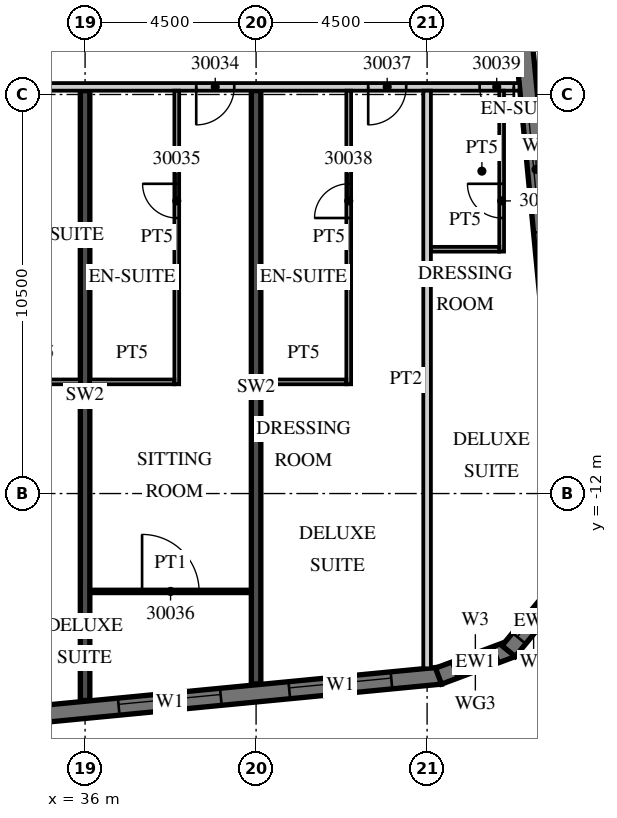
"""IFC4 building model, lengths in metres.
Left out: names, types, materials, properties, quantities, classifications, styles, units other than length and angle.
Written with IfcOpenShell. Run it as: python <this file> out.ifc"""

import sys

from ifc_helpers import new_model, si_unit, direction, frame, frame_2d, origin, place, context, subcontext, project, spatial, polyline, rectangle, outline, extrude, element, fill, save


model = new_model("IFC4")
c1 = context("Model", 3, precision=1e-05, world=origin(), true_north=direction((0.0, 1.0)))
c2 = subcontext(c1, "Body", "Model", "MODEL_VIEW")
j1 = project(units=[si_unit("LENGTHUNIT", "METRE"), si_unit("PLANEANGLEUNIT", "RADIAN")], contexts=[c1])
p1 = place(None, origin())
s1 = spatial("IfcSite", under=j1, at=p1, CompositionType="ELEMENT")
p2 = place(p1, origin())
s2 = spatial("IfcBuilding", under=s1, at=p2, CompositionType="ELEMENT")
p3 = place(p2, frame((0.0, 0.0, 133.9)))
s3 = spatial("IfcBuildingStorey", under=s2, at=p3, CompositionType="ELEMENT", Elevation=133.9)
p4 = place(p3, frame((36.0, -17.444, 0.0), z_axis=(0.0, 0.0, 1.0), x_axis=(0.0, 1.0, 0.0)))
e1 = element("IfcWall", 1, at=p4, inside=s3, PredefinedType="SHEAR", context=c2, shape_type="SweptSolid", body=[
    extrude(rectangle(XDim=16.044, YDim=0.25, at=frame_2d((8.022, 0.0))), origin(), (0.0, 0.0, 1.0), 3.3),
])
p5 = place(p3, frame((40.5, -17.011, 0.0), z_axis=(0.0, 0.0, 1.0), x_axis=(0.0, 1.0, 0.0)))
e2 = element("IfcWall", 2, at=p5, inside=s3, PredefinedType="SHEAR", context=c2, shape_type="SweptSolid", body=[
    extrude(rectangle(XDim=15.611, YDim=0.25, at=frame_2d((7.805, 0.0))), origin(), (0.0, 0.0, 1.0), 3.3),
])
p6 = place(p3, frame((-13.521, -22.46, 0.0), z_axis=(0.0, 0.0, 1.0), x_axis=(0.995396096335, 0.095846812164, 0.0)))
e3 = element("IfcWall", 3, at=p6, inside=s3, PredefinedType="SOLIDWALL", context=c2, shape_type="SweptSolid", body=[
    extrude(rectangle(XDim=59.151, YDim=0.45, at=frame_2d((29.575, 0.0))), origin(), (0.0, 0.0, 1.0), 3.02),
])
p7 = place(p6, frame((0.91, 0.0, 0.45)))
e4 = element("IfcOpeningElement", 4, at=p7, cuts=e3, PredefinedType="OPENING", context=c2, shape_type="SweptSolid", body=[
    extrude(rectangle(XDim=2.7, YDim=2.25, at=frame_2d((1.35, 1.125))), frame((0.0, 0.235, 0.0), z_axis=(0.0, -1.0, 0.0), x_axis=(1.0, 0.0, 0.0)), (0.0, 0.0, 1.0), 0.47),
])
p8 = place(p6, frame((5.431, 0.0, 0.45)))
e5 = element("IfcOpeningElement", 5, at=p8, cuts=e3, PredefinedType="OPENING", context=c2, shape_type="SweptSolid", body=[
    extrude(rectangle(XDim=2.7, YDim=2.25, at=frame_2d((1.35, 1.125))), frame((0.0, 0.235, 0.0), z_axis=(0.0, -1.0, 0.0), x_axis=(1.0, 0.0, 0.0)), (0.0, 0.0, 1.0), 0.47),
])
p9 = place(p6, frame((9.952, 0.0, 0.45)))
e6 = element("IfcOpeningElement", 6, at=p9, cuts=e3, PredefinedType="OPENING", context=c2, shape_type="SweptSolid", body=[
    extrude(rectangle(XDim=2.7, YDim=2.25, at=frame_2d((1.35, 1.125))), frame((0.0, 0.235, 0.0), z_axis=(0.0, -1.0, 0.0), x_axis=(1.0, 0.0, 0.0)), (0.0, 0.0, 1.0), 0.47),
])
p10 = place(p6, frame((14.473, 0.0, 0.45)))
e7 = element("IfcOpeningElement", 7, at=p10, cuts=e3, PredefinedType="OPENING", context=c2, shape_type="SweptSolid", body=[
    extrude(rectangle(XDim=2.7, YDim=2.25, at=frame_2d((1.35, 1.125))), frame((0.0, 0.235, 0.0), z_axis=(0.0, -1.0, 0.0), x_axis=(1.0, 0.0, 0.0)), (0.0, 0.0, 1.0), 0.47),
])
p11 = place(p6, frame((18.994, 0.0, 0.45)))
e8 = element("IfcOpeningElement", 8, at=p11, cuts=e3, PredefinedType="OPENING", context=c2, shape_type="SweptSolid", body=[
    extrude(rectangle(XDim=2.7, YDim=2.25, at=frame_2d((1.35, 1.125))), frame((0.0, 0.235, 0.0), z_axis=(0.0, -1.0, 0.0), x_axis=(1.0, 0.0, 0.0)), (0.0, 0.0, 1.0), 0.47),
])
p12 = place(p6, frame((23.514, 0.0, 0.45)))
e9 = element("IfcOpeningElement", 9, at=p12, cuts=e3, PredefinedType="OPENING", context=c2, shape_type="SweptSolid", body=[
    extrude(rectangle(XDim=2.7, YDim=2.25, at=frame_2d((1.35, 1.125))), frame((0.0, 0.235, 0.0), z_axis=(0.0, -1.0, 0.0), x_axis=(1.0, 0.0, 0.0)), (0.0, 0.0, 1.0), 0.47),
])
p13 = place(p6, frame((28.035, 0.0, 0.45)))
e10 = element("IfcOpeningElement", 10, at=p13, cuts=e3, PredefinedType="OPENING", context=c2, shape_type="SweptSolid", body=[
    extrude(rectangle(XDim=2.7, YDim=2.25, at=frame_2d((1.35, 1.125))), frame((0.0, 0.235, 0.0), z_axis=(0.0, -1.0, 0.0), x_axis=(1.0, 0.0, 0.0)), (0.0, 0.0, 1.0), 0.47),
])
p14 = place(p6, frame((32.556, 0.0, 0.45)))
e11 = element("IfcOpeningElement", 11, at=p14, cuts=e3, PredefinedType="OPENING", context=c2, shape_type="SweptSolid", body=[
    extrude(rectangle(XDim=2.7, YDim=2.25, at=frame_2d((1.35, 1.125))), frame((0.0, 0.235, 0.0), z_axis=(0.0, -1.0, 0.0), x_axis=(1.0, 0.0, 0.0)), (0.0, 0.0, 1.0), 0.47),
])
p15 = place(p6, frame((37.077, 0.0, 0.45)))
e12 = element("IfcOpeningElement", 12, at=p15, cuts=e3, PredefinedType="OPENING", context=c2, shape_type="SweptSolid", body=[
    extrude(rectangle(XDim=2.7, YDim=2.25, at=frame_2d((1.35, 1.125))), frame((0.0, 0.235, 0.0), z_axis=(0.0, -1.0, 0.0), x_axis=(1.0, 0.0, 0.0)), (0.0, 0.0, 1.0), 0.47),
])
p16 = place(p6, frame((41.598, 0.0, 0.45)))
e13 = element("IfcOpeningElement", 13, at=p16, cuts=e3, PredefinedType="OPENING", context=c2, shape_type="SweptSolid", body=[
    extrude(rectangle(XDim=2.7, YDim=2.25, at=frame_2d((1.35, 1.125))), frame((0.0, 0.235, 0.0), z_axis=(0.0, -1.0, 0.0), x_axis=(1.0, 0.0, 0.0)), (0.0, 0.0, 1.0), 0.47),
])
p17 = place(p6, frame((46.118, 0.0, 0.45)))
e14 = element("IfcOpeningElement", 14, at=p17, cuts=e3, PredefinedType="OPENING", context=c2, shape_type="SweptSolid", body=[
    extrude(rectangle(XDim=2.7, YDim=2.25, at=frame_2d((1.35, 1.125))), frame((0.0, 0.235, 0.0), z_axis=(0.0, -1.0, 0.0), x_axis=(1.0, 0.0, 0.0)), (0.0, 0.0, 1.0), 0.47),
])
p18 = place(p6, frame((50.639, 0.0, 0.45)))
e15 = element("IfcOpeningElement", 15, at=p18, cuts=e3, PredefinedType="OPENING", context=c2, shape_type="SweptSolid", body=[
    extrude(rectangle(XDim=2.7, YDim=2.25, at=frame_2d((1.35, 1.125))), frame((0.0, 0.235, 0.0), z_axis=(0.0, -1.0, 0.0), x_axis=(1.0, 0.0, 0.0)), (0.0, 0.0, 1.0), 0.47),
])
p19 = place(p6, frame((55.15, 0.0, 0.45)))
e16 = element("IfcOpeningElement", 16, at=p19, cuts=e3, PredefinedType="OPENING", context=c2, shape_type="SweptSolid", body=[
    extrude(rectangle(XDim=2.7, YDim=2.25, at=frame_2d((1.35, 1.125))), frame((0.0, 0.235, 0.0), z_axis=(0.0, -1.0, 0.0), x_axis=(1.0, 0.0, 0.0)), (0.0, 0.0, 1.0), 0.47),
])
p20 = place(p3, frame((45.3, -16.804, 0.0), z_axis=(0.0, 0.0, 1.0), x_axis=(0.936677599948, 0.350192909346, 0.0)))
e17 = element("IfcWall", 17, at=p20, inside=s3, PredefinedType="SOLIDWALL", context=c2, shape_type="SweptSolid", body=[
    extrude(outline(polyline([(0.0, -0.225), (2.071, -0.225), (1.95, 0.225), (0.121, 0.225), (0.0, -0.225)])), origin(), (0.0, 0.0, 1.0), 3.02),
])
p21 = place(p20, frame((0.435, 0.0, 0.45)))
e18 = element("IfcOpeningElement", 18, at=p21, cuts=e17, PredefinedType="OPENING", context=c2, shape_type="SweptSolid", body=[
    extrude(rectangle(XDim=1.2, YDim=2.25, at=frame_2d((0.6, 1.125))), frame((0.0, 0.235, 0.0), z_axis=(0.0, -1.0, 0.0), x_axis=(1.0, 0.0, 0.0)), (0.0, 0.0, 1.0), 0.47),
])
p22 = place(p3, frame((47.145, -16.147, 0.0), z_axis=(0.0, 0.0, 1.0), x_axis=(0.635988241739, 0.771698747161, 0.0)))
e19 = element("IfcWall", 19, at=p22, inside=s3, PredefinedType="SOLIDWALL", context=c2, shape_type="SweptSolid", body=[
    extrude(outline(polyline([(0.0, -0.225), (2.071, -0.225), (1.95, 0.225), (0.121, 0.225), (0.0, -0.225)])), origin(), (0.0, 0.0, 1.0), 3.02),
])
p23 = place(p22, frame((0.435, 0.0, 0.45)))
e20 = element("IfcOpeningElement", 20, at=p23, cuts=e19, PredefinedType="OPENING", context=c2, shape_type="SweptSolid", body=[
    extrude(rectangle(XDim=1.2, YDim=2.25, at=frame_2d((0.6, 1.125))), frame((0.0, 0.235, 0.0), z_axis=(0.0, -1.0, 0.0), x_axis=(1.0, 0.0, 0.0)), (0.0, 0.0, 1.0), 0.47),
])
p24 = place(p3, frame((48.753, -12.672, 0.0), z_axis=(0.0, 0.0, 1.0), x_axis=(-0.095842661909, 0.995396495954, 0.0)))
e21 = element("IfcWall", 21, at=p24, inside=s3, PredefinedType="SOLIDWALL", context=c2, shape_type="SweptSolid", body=[
    extrude(rectangle(XDim=35.0, YDim=0.45, at=frame_2d((17.5, 0.0))), origin(), (0.0, 0.0, 1.0), 3.02),
])
p25 = place(p24, frame((3.072, 0.0, 0.45)))
e22 = element("IfcOpeningElement", 22, at=p25, cuts=e21, PredefinedType="OPENING", context=c2, shape_type="SweptSolid", body=[
    extrude(rectangle(XDim=3.3, YDim=2.25, at=frame_2d((1.65, 1.125))), frame((0.0, 0.235, 0.0), z_axis=(0.0, -1.0, 0.0), x_axis=(1.0, 0.0, 0.0)), (0.0, 0.0, 1.0), 0.47),
])
p26 = place(p24, frame((7.593, 0.0, 0.45)))
e23 = element("IfcOpeningElement", 23, at=p26, cuts=e21, PredefinedType="OPENING", context=c2, shape_type="SweptSolid", body=[
    extrude(rectangle(XDim=3.3, YDim=2.25, at=frame_2d((1.65, 1.125))), frame((0.0, 0.235, 0.0), z_axis=(0.0, -1.0, 0.0), x_axis=(1.0, 0.0, 0.0)), (0.0, 0.0, 1.0), 0.47),
])
p27 = place(p3, frame((-13.5, -1.3, 0.0), z_axis=(0.0, 0.0, 1.0), x_axis=(1.0, 0.0, 0.0)))
e24 = element("IfcWall", 24, at=p27, inside=s3, PredefinedType="PARTITIONING", context=c2, shape_type="SweptSolid", body=[
    extrude(rectangle(XDim=60.932, YDim=0.2, at=frame_2d((30.466, 0.0))), origin(), (0.0, 0.0, 1.0), 3.02),
])
p28 = place(p27, frame((2.925, 0.0, 0.0)))
e25 = element("IfcOpeningElement", 25, at=p28, cuts=e24, PredefinedType="OPENING", context=c2, shape_type="SweptSolid", body=[
    extrude(rectangle(XDim=1.0, YDim=2.1, at=frame_2d((0.5, 1.05))), frame((0.0, 0.11, 0.0), z_axis=(0.0, -1.0, 0.0), x_axis=(1.0, 0.0, 0.0)), (0.0, 0.0, 1.0), 0.22),
])
p29 = place(p27, frame((9.863, 0.0, 0.0)))
e26 = element("IfcOpeningElement", 26, at=p29, cuts=e24, PredefinedType="OPENING", context=c2, shape_type="SweptSolid", body=[
    extrude(rectangle(XDim=1.2, YDim=2.1, at=frame_2d((0.6, 1.05))), frame((0.0, 0.11, 0.0), z_axis=(0.0, -1.0, 0.0), x_axis=(1.0, 0.0, 0.0)), (0.0, 0.0, 1.0), 0.22),
])
p30 = place(p27, frame((14.075, 0.0, 0.0)))
e27 = element("IfcOpeningElement", 27, at=p30, cuts=e24, PredefinedType="OPENING", context=c2, shape_type="SweptSolid", body=[
    extrude(rectangle(XDim=1.0, YDim=2.1, at=frame_2d((0.5, 1.05))), frame((0.0, 0.11, 0.0), z_axis=(0.0, -1.0, 0.0), x_axis=(1.0, 0.0, 0.0)), (0.0, 0.0, 1.0), 0.22),
])
p31 = place(p27, frame((18.55, 0.0, 0.0)))
e28 = element("IfcOpeningElement", 28, at=p31, cuts=e24, PredefinedType="OPENING", context=c2, shape_type="SweptSolid", body=[
    extrude(rectangle(XDim=1.0, YDim=2.1, at=frame_2d((0.5, 1.05))), frame((0.0, 0.11, 0.0), z_axis=(0.0, -1.0, 0.0), x_axis=(1.0, 0.0, 0.0)), (0.0, 0.0, 1.0), 0.22),
])
p32 = place(p27, frame((24.938, 0.0, 0.0)))
e29 = element("IfcOpeningElement", 29, at=p32, cuts=e24, PredefinedType="OPENING", context=c2, shape_type="SweptSolid", body=[
    extrude(rectangle(XDim=1.2, YDim=2.1, at=frame_2d((0.6, 1.05))), frame((0.0, 0.11, 0.0), z_axis=(0.0, -1.0, 0.0), x_axis=(1.0, 0.0, 0.0)), (0.0, 0.0, 1.0), 0.22),
])
p33 = place(p27, frame((36.862, 0.0, 0.0)))
e30 = element("IfcOpeningElement", 30, at=p33, cuts=e24, PredefinedType="OPENING", context=c2, shape_type="SweptSolid", body=[
    extrude(rectangle(XDim=1.2, YDim=2.1, at=frame_2d((0.6, 1.05))), frame((0.0, 0.11, 0.0), z_axis=(0.0, -1.0, 0.0), x_axis=(1.0, 0.0, 0.0)), (0.0, 0.0, 1.0), 0.22),
])
p34 = place(p27, frame((41.075, 0.0, 0.0)))
e31 = element("IfcOpeningElement", 31, at=p34, cuts=e24, PredefinedType="OPENING", context=c2, shape_type="SweptSolid", body=[
    extrude(rectangle(XDim=1.0, YDim=2.1, at=frame_2d((0.5, 1.05))), frame((0.0, 0.11, 0.0), z_axis=(0.0, -1.0, 0.0), x_axis=(1.0, 0.0, 0.0)), (0.0, 0.0, 1.0), 0.22),
])
p35 = place(p27, frame((45.55, 0.0, 0.0)))
e32 = element("IfcOpeningElement", 32, at=p35, cuts=e24, PredefinedType="OPENING", context=c2, shape_type="SweptSolid", body=[
    extrude(rectangle(XDim=1.0, YDim=2.1, at=frame_2d((0.5, 1.05))), frame((0.0, 0.11, 0.0), z_axis=(0.0, -1.0, 0.0), x_axis=(1.0, 0.0, 0.0)), (0.0, 0.0, 1.0), 0.22),
])
p36 = place(p27, frame((52.425, 0.0, 0.0)))
e33 = element("IfcOpeningElement", 33, at=p36, cuts=e24, PredefinedType="OPENING", context=c2, shape_type="SweptSolid", body=[
    extrude(rectangle(XDim=1.0, YDim=2.1, at=frame_2d((0.5, 1.05))), frame((0.0, 0.11, 0.0), z_axis=(0.0, -1.0, 0.0), x_axis=(1.0, 0.0, 0.0)), (0.0, 0.0, 1.0), 0.22),
])
p37 = place(p27, frame((56.95, 0.0, 0.0)))
e34 = element("IfcOpeningElement", 34, at=p37, cuts=e24, PredefinedType="OPENING", context=c2, shape_type="SweptSolid", body=[
    extrude(rectangle(XDim=1.0, YDim=2.1, at=frame_2d((0.5, 1.05))), frame((0.0, 0.11, 0.0), z_axis=(0.0, -1.0, 0.0), x_axis=(1.0, 0.0, 0.0)), (0.0, 0.0, 1.0), 0.22),
])
p38 = place(p27, frame((59.882, 0.0, 0.0)))
e35 = element("IfcOpeningElement", 35, at=p38, cuts=e24, PredefinedType="OPENING", context=c2, shape_type="SweptSolid", body=[
    extrude(rectangle(XDim=0.9, YDim=2.1, at=frame_2d((0.45, 1.05))), frame((0.0, 0.11, 0.0), z_axis=(0.0, -1.0, 0.0), x_axis=(1.0, 0.0, 0.0)), (0.0, 0.0, 1.0), 0.22),
])
p39 = place(p3, frame((33.625, -9.062, 0.0), z_axis=(0.0, 0.0, 1.0), x_axis=(1.0, 0.0, 0.0)))
e36 = element("IfcWall", 36, at=p39, inside=s3, PredefinedType="PARTITIONING", context=c2, shape_type="SweptSolid", body=[
    extrude(rectangle(XDim=2.25, YDim=0.125, at=frame_2d((1.125, 0.0))), origin(), (0.0, 0.0, 1.0), 3.02),
])
p40 = place(p3, frame((38.413, -9.125, 0.0), z_axis=(0.0, 0.0, 1.0), x_axis=(0.0, 1.0, 0.0)))
e37 = element("IfcWall", 37, at=p40, inside=s3, PredefinedType="PARTITIONING", context=c2, shape_type="SweptSolid", body=[
    extrude(rectangle(XDim=7.725, YDim=0.125, at=frame_2d((3.863, 0.0))), origin(), (0.0, 0.0, 1.0), 3.02),
])
p41 = place(p40, frame((4.375, 0.0, 0.0)))
e38 = element("IfcOpeningElement", 38, at=p41, cuts=e37, PredefinedType="OPENING", context=c2, shape_type="SweptSolid", body=[
    extrude(rectangle(XDim=0.9, YDim=2.1, at=frame_2d((0.45, 1.05))), frame((0.0, 0.073, 0.0), z_axis=(0.0, -1.0, 0.0), x_axis=(1.0, 0.0, 0.0)), (0.0, 0.0, 1.0), 0.145),
])
p42 = place(p3, frame((36.125, -9.062, 0.0), z_axis=(0.0, 0.0, 1.0), x_axis=(1.0, 0.0, 0.0)))
e39 = element("IfcWall", 39, at=p42, inside=s3, PredefinedType="PARTITIONING", context=c2, shape_type="SweptSolid", body=[
    extrude(rectangle(XDim=2.225, YDim=0.125, at=frame_2d((1.113, 0.0))), origin(), (0.0, 0.0, 1.0), 3.02),
])
p43 = place(p3, frame((36.125, -14.575, 0.0), z_axis=(0.0, 0.0, 1.0), x_axis=(1.0, 0.0, 0.0)))
e40 = element("IfcWall", 40, at=p43, inside=s3, PredefinedType="PARTITIONING", context=c2, shape_type="SweptSolid", body=[
    extrude(rectangle(XDim=4.25, YDim=0.1, at=frame_2d((2.125, 0.0))), origin(), (0.0, 0.0, 1.0), 3.02),
])
p44 = place(p43, frame((1.375, 0.0, 0.0)))
e41 = element("IfcOpeningElement", 41, at=p44, cuts=e40, PredefinedType="OPENING", context=c2, shape_type="SweptSolid", body=[
    extrude(rectangle(XDim=1.5, YDim=2.1, at=frame_2d((0.75, 1.05))), frame((0.0, 0.06, 0.0), z_axis=(0.0, -1.0, 0.0), x_axis=(1.0, 0.0, 0.0)), (0.0, 0.0, 1.0), 0.12),
])
p45 = place(p3, frame((45.0, -16.599, 0.0), z_axis=(0.0, 0.0, 1.0), x_axis=(0.0, 1.0, 0.0)))
e42 = element("IfcWall", 42, at=p45, inside=s3, PredefinedType="PARTITIONING", context=c2, shape_type="SweptSolid", body=[
    extrude(rectangle(XDim=15.199, YDim=0.2, at=frame_2d((7.6, 0.0))), origin(), (0.0, 0.0, 1.0), 3.02),
])
p46 = place(p3, frame((42.938, -9.125, 0.0), z_axis=(0.0, 0.0, 1.0), x_axis=(0.0, 1.0, 0.0)))
e43 = element("IfcWall", 43, at=p46, inside=s3, PredefinedType="PARTITIONING", context=c2, shape_type="SweptSolid", body=[
    extrude(rectangle(XDim=7.725, YDim=0.125, at=frame_2d((3.863, 0.0))), origin(), (0.0, 0.0, 1.0), 3.02),
])
p47 = place(p46, frame((4.375, 0.0, 0.0)))
e44 = element("IfcOpeningElement", 44, at=p47, cuts=e43, PredefinedType="OPENING", context=c2, shape_type="SweptSolid", body=[
    extrude(rectangle(XDim=0.9, YDim=2.1, at=frame_2d((0.45, 1.05))), frame((0.0, 0.073, 0.0), z_axis=(0.0, -1.0, 0.0), x_axis=(1.0, 0.0, 0.0)), (0.0, 0.0, 1.0), 0.145),
])
p48 = place(p3, frame((40.625, -9.062, 0.0), z_axis=(0.0, 0.0, 1.0), x_axis=(1.0, 0.0, 0.0)))
e45 = element("IfcWall", 45, at=p48, inside=s3, PredefinedType="PARTITIONING", context=c2, shape_type="SweptSolid", body=[
    extrude(rectangle(XDim=2.25, YDim=0.125, at=frame_2d((1.125, 0.0))), origin(), (0.0, 0.0, 1.0), 3.02),
])
p49 = place(p3, frame((46.962, -5.634, 0.0), z_axis=(0.0, 0.0, 1.0), x_axis=(0.0, 1.0, 0.0)))
e46 = element("IfcWall", 46, at=p49, inside=s3, PredefinedType="PARTITIONING", context=c2, shape_type="SweptSolid", body=[
    extrude(rectangle(XDim=4.234, YDim=0.125, at=frame_2d((2.117, 0.0))), origin(), (0.0, 0.0, 1.0), 3.02),
])
p50 = place(p49, frame((0.884, 0.0, 0.0)))
e47 = element("IfcOpeningElement", 47, at=p50, cuts=e46, PredefinedType="OPENING", context=c2, shape_type="SweptSolid", body=[
    extrude(rectangle(XDim=0.9, YDim=2.1, at=frame_2d((0.45, 1.05))), frame((0.0, 0.073, 0.0), z_axis=(0.0, -1.0, 0.0), x_axis=(1.0, 0.0, 0.0)), (0.0, 0.0, 1.0), 0.145),
])
p51 = place(p3, frame((45.1, -5.572, 0.0), z_axis=(0.0, 0.0, 1.0), x_axis=(1.0, 0.0, 0.0)))
e48 = element("IfcWall", 48, at=p51, inside=s3, PredefinedType="PARTITIONING", context=c2, shape_type="SweptSolid", body=[
    extrude(rectangle(XDim=1.8, YDim=0.125, at=frame_2d((0.9, 0.0))), origin(), (0.0, 0.0, 1.0), 3.02),
])
p52 = place(p18, origin())
e49 = element("IfcWindow", 49, at=p52, inside=s3, PartitioningType="SINGLE_PANEL", PredefinedType="WINDOW", context=c2, shape_type="SweptSolid", body=[
    extrude(rectangle(XDim=2.7, YDim=2.25, at=frame_2d((1.35, 1.125))), frame((0.0, 0.09, 0.0), z_axis=(0.0, -1.0, 0.0), x_axis=(1.0, 0.0, 0.0)), (0.0, 0.0, 1.0), 0.06),
])
fill(e15, e49)
p53 = place(p19, origin())
e50 = element("IfcWindow", 50, at=p53, inside=s3, PartitioningType="SINGLE_PANEL", PredefinedType="WINDOW", context=c2, shape_type="SweptSolid", body=[
    extrude(rectangle(XDim=2.7, YDim=2.25, at=frame_2d((1.35, 1.125))), frame((0.0, 0.09, 0.0), z_axis=(0.0, -1.0, 0.0), x_axis=(1.0, 0.0, 0.0)), (0.0, 0.0, 1.0), 0.06),
])
fill(e16, e50)
p54 = place(p21, origin())
e51 = element("IfcWindow", 51, at=p54, inside=s3, PartitioningType="SINGLE_PANEL", PredefinedType="WINDOW", context=c2, shape_type="SweptSolid", body=[
    extrude(rectangle(XDim=1.2, YDim=2.25, at=frame_2d((0.6, 1.125))), frame((0.0, 0.09, 0.0), z_axis=(0.0, -1.0, 0.0), x_axis=(1.0, 0.0, 0.0)), (0.0, 0.0, 1.0), 0.06),
])
fill(e18, e51)
p55 = place(p23, origin())
e52 = element("IfcWindow", 52, at=p55, inside=s3, PartitioningType="SINGLE_PANEL", PredefinedType="WINDOW", context=c2, shape_type="SweptSolid", body=[
    extrude(rectangle(XDim=1.2, YDim=2.25, at=frame_2d((0.6, 1.125))), frame((0.0, 0.09, 0.0), z_axis=(0.0, -1.0, 0.0), x_axis=(1.0, 0.0, 0.0)), (0.0, 0.0, 1.0), 0.06),
])
fill(e20, e52)
p56 = place(p26, origin())
e53 = element("IfcWindow", 53, at=p56, inside=s3, PartitioningType="SINGLE_PANEL", PredefinedType="WINDOW", context=c2, shape_type="SweptSolid", body=[
    extrude(rectangle(XDim=3.3, YDim=2.25, at=frame_2d((1.65, 1.125))), frame((0.0, 0.09, 0.0), z_axis=(0.0, -1.0, 0.0), x_axis=(1.0, 0.0, 0.0)), (0.0, 0.0, 1.0), 0.06),
])
fill(e23, e53)
p57 = place(p36, origin())
e54 = element("IfcDoor", 54, at=p57, inside=s3, OperationType="SINGLE_SWING_LEFT", PredefinedType="DOOR", context=c2, shape_type="SweptSolid", body=[
    extrude(rectangle(XDim=1.0, YDim=2.1, at=frame_2d((0.5, 1.05))), frame((0.0, 0.025, 0.0), z_axis=(0.0, -1.0, 0.0), x_axis=(1.0, 0.0, 0.0)), (0.0, 0.0, 1.0), 0.05),
])
fill(e33, e54)
p58 = place(p41, origin())
e55 = element("IfcDoor", 55, at=p58, inside=s3, OperationType="SINGLE_SWING_RIGHT", PredefinedType="DOOR", context=c2, shape_type="SweptSolid", body=[
    extrude(rectangle(XDim=0.9, YDim=2.1, at=frame_2d((0.45, 1.05))), frame((0.0, 0.025, 0.0), z_axis=(0.0, -1.0, 0.0), x_axis=(1.0, 0.0, 0.0)), (0.0, 0.0, 1.0), 0.05),
])
fill(e38, e55)
p59 = place(p44, origin())
e56 = element("IfcDoor", 56, at=p59, inside=s3, OperationType="SINGLE_SWING_LEFT", PredefinedType="DOOR", context=c2, shape_type="SweptSolid", body=[
    extrude(rectangle(XDim=1.5, YDim=2.1, at=frame_2d((0.75, 1.05))), frame((0.0, 0.025, 0.0), z_axis=(0.0, -1.0, 0.0), x_axis=(1.0, 0.0, 0.0)), (0.0, 0.0, 1.0), 0.05),
])
fill(e41, e56)
p60 = place(p37, origin())
e57 = element("IfcDoor", 57, at=p60, inside=s3, OperationType="SINGLE_SWING_LEFT", PredefinedType="DOOR", context=c2, shape_type="SweptSolid", body=[
    extrude(rectangle(XDim=1.0, YDim=2.1, at=frame_2d((0.5, 1.05))), frame((0.0, 0.025, 0.0), z_axis=(0.0, -1.0, 0.0), x_axis=(1.0, 0.0, 0.0)), (0.0, 0.0, 1.0), 0.05),
])
fill(e34, e57)
p61 = place(p47, origin())
e58 = element("IfcDoor", 58, at=p61, inside=s3, OperationType="SINGLE_SWING_LEFT", PredefinedType="DOOR", context=c2, shape_type="SweptSolid", body=[
    extrude(rectangle(XDim=0.9, YDim=2.1, at=frame_2d((0.45, 1.05))), frame((0.0, 0.025, 0.0), z_axis=(0.0, -1.0, 0.0), x_axis=(1.0, 0.0, 0.0)), (0.0, 0.0, 1.0), 0.05),
])
fill(e44, e58)
p62 = place(p38, origin())
e59 = element("IfcDoor", 59, at=p62, inside=s3, OperationType="SINGLE_SWING_RIGHT", PredefinedType="DOOR", context=c2, shape_type="SweptSolid", body=[
    extrude(rectangle(XDim=0.9, YDim=2.1, at=frame_2d((0.45, 1.05))), frame((0.0, 0.025, 0.0), z_axis=(0.0, -1.0, 0.0), x_axis=(1.0, 0.0, 0.0)), (0.0, 0.0, 1.0), 0.05),
])
fill(e35, e59)
p63 = place(p50, origin())
e60 = element("IfcDoor", 60, at=p63, inside=s3, OperationType="SINGLE_SWING_RIGHT", PredefinedType="DOOR", context=c2, shape_type="SweptSolid", body=[
    extrude(rectangle(XDim=0.9, YDim=2.1, at=frame_2d((0.45, 1.05))), frame((0.0, 0.025, 0.0), z_axis=(0.0, -1.0, 0.0), x_axis=(1.0, 0.0, 0.0)), (0.0, 0.0, 1.0), 0.05),
])
fill(e47, e60)
save(model, sys.argv[1])
